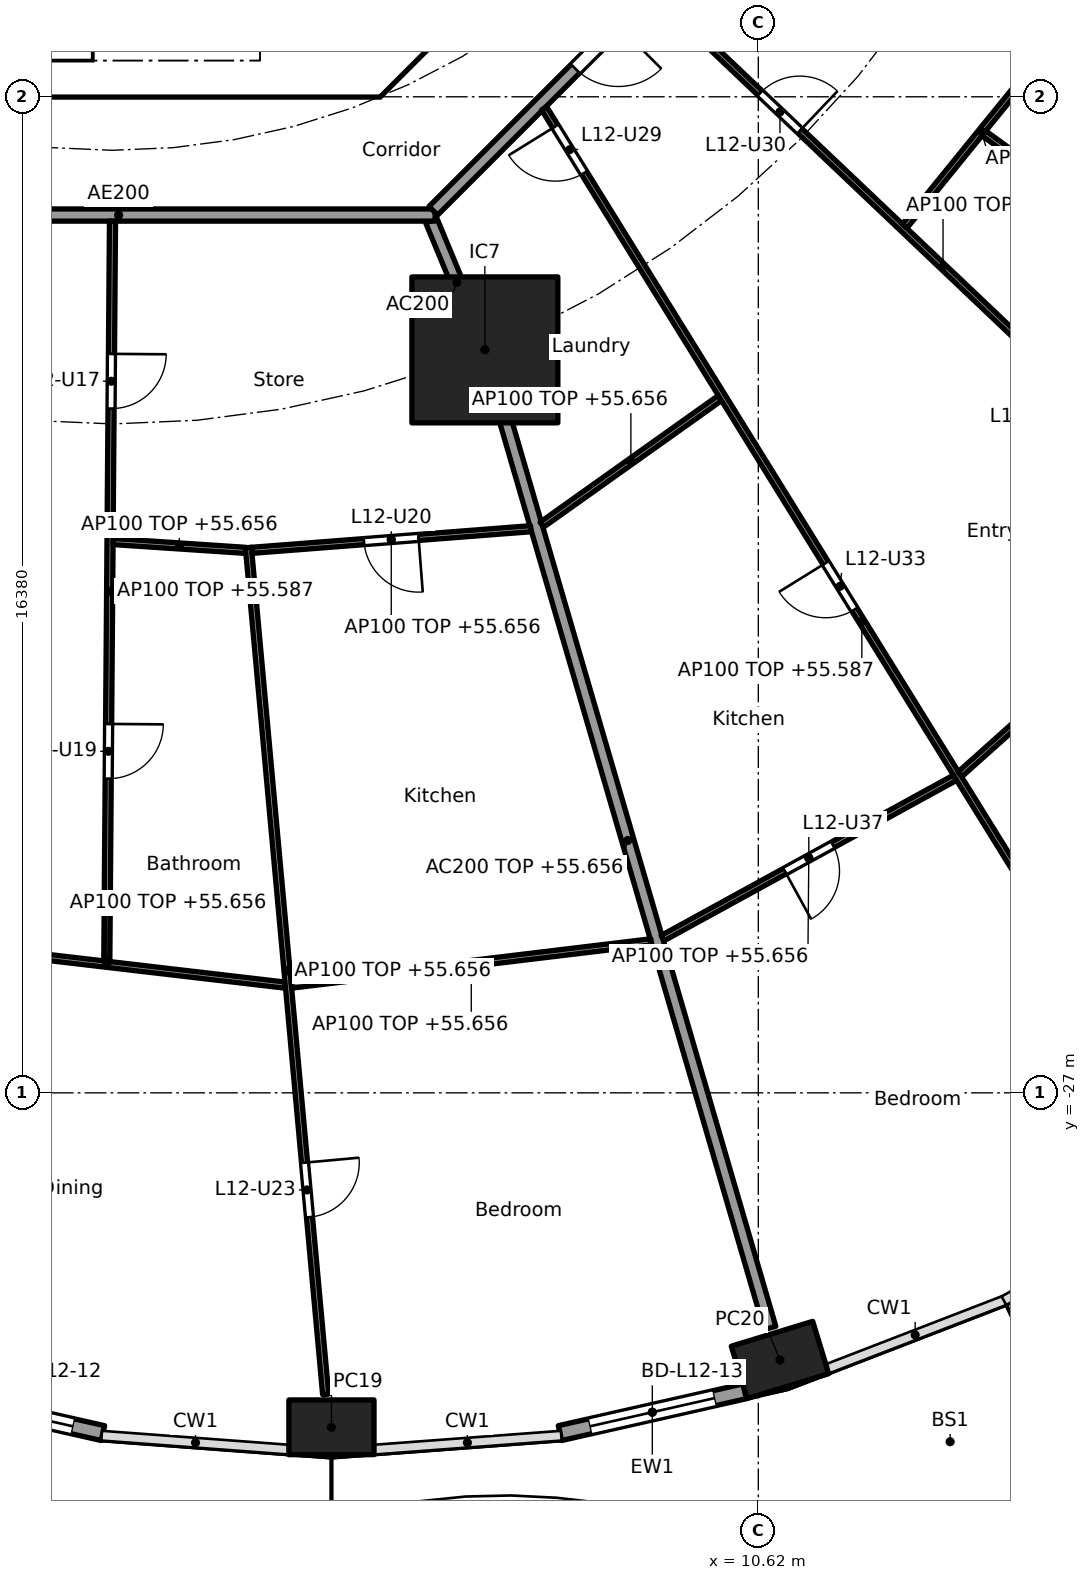
"""IFC4 building model, lengths in metres.
Left out: names, types, materials, properties, quantities, classifications, styles, units other than length and angle.
Written with IfcOpenShell. Run it as: python <this file> out.ifc"""

import sys

from ifc_helpers import new_model, si_unit, direction, frame, frame_2d, origin, origin_2d, place, context, subcontext, project, spatial, polyline, rectangle, hollow_rectangle, outline, extrude, element, fill, save


model = new_model("IFC4")
c1 = context("Model", 3, precision=1e-05, world=origin(), true_north=direction((0.0, 1.0)))
c2 = subcontext(c1, "Body", "Model", "MODEL_VIEW")
j1 = project(units=[si_unit("LENGTHUNIT", "METRE"), si_unit("PLANEANGLEUNIT", "RADIAN")], contexts=[c1])
p1 = place(None, origin())
s1 = spatial("IfcSite", under=j1, at=p1, CompositionType="ELEMENT")
p2 = place(p1, origin())
s2 = spatial("IfcBuilding", under=s1, at=p2, CompositionType="ELEMENT")
p3 = place(p2, frame((0.0, 0.0, 52.9)))
s3 = spatial("IfcBuildingStorey", under=s2, at=p3, CompositionType="ELEMENT", Elevation=52.9)
for number, where, z_axis, x_axis in (
    (1, (3.6, -32.5, 0.0), (0.0, 0.0, 1.0), (1.0, 0.0, 0.0)),
    (2, (10.976, -31.393, 0.0), (0.0, 0.0, 1.0), (0.957, 0.292, 0.0)),
):
    element("IfcColumn", number, at=place(p3, frame(where, z_axis=z_axis, x_axis=x_axis)), inside=s3, PredefinedType="COLUMN", context=c2, shape_type="SweptSolid", body=[
        extrude(hollow_rectangle(XDim=1.4, YDim=0.9, WallThickness=0.05, at=origin_2d()), origin(), (0.0, 0.0, 1.0), 3.7),
    ])
p4 = place(p3, frame((6.123, -14.782, 0.0), z_axis=(0.0, 0.0, 1.0), x_axis=(1.0, 0.0, 0.0)))
e3 = element("IfcColumn", 3, at=p4, inside=s3, PredefinedType="COLUMN", context=c2, shape_type="SweptSolid", body=[
    extrude(rectangle(XDim=2.4, YDim=2.4, at=origin_2d()), origin(), (0.0, 0.0, 1.0), 3.7),
])
p5 = place(p3, frame((-0.158, -32.596, 0.0), z_axis=(0.0, 0.0, 1.0), x_axis=(-0.975331134677, 0.220746863466, 0.0)))
e4 = element("IfcWall", 4, at=p5, inside=s3, PredefinedType="SOLIDWALL", context=c2, shape_type="SweptSolid", body=[
    extrude(rectangle(XDim=3.115, YDim=0.25, at=frame_2d((1.557, 0.0))), origin(), (0.0, 0.0, 1.0), 3.44),
])
p6 = place(p5, frame((0.507, 0.0, 0.0)))
e5 = element("IfcOpeningElement", 5, at=p6, cuts=e4, PredefinedType="OPENING", context=c2, shape_type="SweptSolid", body=[
    extrude(rectangle(XDim=2.1, YDim=2.4, at=frame_2d((1.05, 1.2))), frame((0.0, 0.135, 0.0), z_axis=(0.0, -1.0, 0.0), x_axis=(1.0, 0.0, 0.0)), (0.0, 0.0, 1.0), 0.27),
])
p7 = place(p3, frame((10.396, -31.908, 0.0), z_axis=(0.0, 0.0, 1.0), x_axis=(-0.97533495413, -0.220729987208, 0.0)))
e6 = element("IfcWall", 6, at=p7, inside=s3, PredefinedType="SOLIDWALL", context=c2, shape_type="SweptSolid", body=[
    extrude(rectangle(XDim=3.115, YDim=0.25, at=frame_2d((1.557, 0.0))), origin(), (0.0, 0.0, 1.0), 3.44),
])
p8 = place(p7, frame((0.507, 0.0, 0.0)))
e7 = element("IfcOpeningElement", 7, at=p8, cuts=e6, PredefinedType="OPENING", context=c2, shape_type="SweptSolid", body=[
    extrude(rectangle(XDim=2.1, YDim=2.4, at=frame_2d((1.05, 1.2))), frame((0.0, 0.135, 0.0), z_axis=(0.0, -1.0, 0.0), x_axis=(1.0, 0.0, 0.0)), (0.0, 0.0, 1.0), 0.27),
])
p9 = place(p3, frame((4.613, -9.988, 0.0), z_axis=(0.0, 0.0, 1.0), x_axis=(0.707106781187, 0.707106781187, 0.0)))
e8 = element("IfcWall", 8, at=p9, inside=s3, PredefinedType="SHEAR", context=c2, shape_type="SweptSolid", body=[
    extrude(rectangle(XDim=7.602, YDim=0.6, at=frame_2d((3.801, 0.0))), origin(), (0.0, 0.0, 1.0), 3.44),
])
p10 = place(p9, frame((3.201, 0.0, 0.0)))
e9 = element("IfcOpeningElement", 9, at=p10, cuts=e8, PredefinedType="OPENING", context=c2, shape_type="SweptSolid", body=[
    extrude(rectangle(XDim=1.2, YDim=2.1, at=frame_2d((0.6, 1.05))), frame((0.0, 0.31, 0.0), z_axis=(0.0, -1.0, 0.0), x_axis=(1.0, 0.0, 0.0)), (0.0, 0.0, 1.0), 0.62),
])
p11 = place(p3, frame((4.0, -10.025, 0.0), z_axis=(0.0, 0.0, 1.0), x_axis=(0.0, 1.0, 0.0)))
e10 = element("IfcWall", 10, at=p11, inside=s3, PredefinedType="SOLIDWALL", context=c2, shape_type="SweptSolid", body=[
    extrude(rectangle(XDim=3.0, YDim=0.2, at=frame_2d((1.5, 0.0))), origin(), (0.0, 0.0, 1.0), 3.44),
])
p12 = place(p11, frame((0.975, 0.0, 0.0)))
e11 = element("IfcOpeningElement", 11, at=p12, cuts=e10, PredefinedType="OPENING", context=c2, shape_type="SweptSolid", body=[
    extrude(rectangle(XDim=1.1, YDim=2.1, at=frame_2d((0.55, 1.05))), frame((0.0, 0.11, 0.0), z_axis=(0.0, -1.0, 0.0), x_axis=(1.0, 0.0, 0.0)), (0.0, 0.0, 1.0), 0.22),
])
p13 = place(p3, origin())
e12 = element("IfcWall", 12, at=p13, inside=s3, PredefinedType="SHEAR", context=c2, shape_type="SweptSolid", body=[
    extrude(outline(polyline([(-4.152, -10.025), (4.152, -10.025), (4.401, -9.776), (4.825, -10.2), (4.401, -10.625), (-4.401, -10.625), (-4.825, -10.2), (-4.401, -9.776), (-4.152, -10.025)])), origin(), (0.0, 0.0, 1.0), 3.44),
])
p14 = place(p3, frame((5.243, -12.657, 0.0), z_axis=(0.0, 0.0, 1.0), x_axis=(0.382707856524, -0.923869415315, 0.0)))
e13 = element("IfcWall", 13, at=p14, inside=s3, PredefinedType="PARTITIONING", context=c2, shape_type="SweptSolid", body=[
    extrude(rectangle(XDim=2.2, YDim=0.2, at=frame_2d((1.1, 0.0))), origin(), (0.0, 0.0, 1.0), 3.44),
])
p15 = place(p3, frame((6.137, -14.83, 0.0), z_axis=(0.0, 0.0, 1.0), x_axis=(0.27985745069, -0.960041565399, 0.0)))
e14 = element("IfcWall", 14, at=p15, inside=s3, PredefinedType="PARTITIONING", context=c2, shape_type="SweptSolid", body=[
    extrude(rectangle(XDim=16.705, YDim=0.2, at=frame_2d((8.353, 0.0))), origin(), (0.0, 0.0, 1.0), 2.756),
])
p16 = place(p3, frame((-5.104, -12.565, 0.0), z_axis=(0.0, 0.0, 1.0), x_axis=(1.0, 0.0, 0.0)))
e15 = element("IfcWall", 15, at=p16, inside=s3, PredefinedType="PARTITIONING", context=c2, shape_type="SweptSolid", body=[
    extrude(rectangle(XDim=10.409, YDim=0.2, at=frame_2d((5.205, 0.0))), origin(), (0.0, 0.0, 1.0), 3.44),
])
p17 = place(p16, frame((2.87, 0.0, 0.0)))
e16 = element("IfcOpeningElement", 16, at=p17, cuts=e15, PredefinedType="OPENING", context=c2, shape_type="SweptSolid", body=[
    extrude(rectangle(XDim=1.0, YDim=2.1, at=frame_2d((0.5, 1.05))), frame((0.0, 0.11, 0.0), z_axis=(0.0, -1.0, 0.0), x_axis=(1.0, 0.0, 0.0)), (0.0, 0.0, 1.0), 0.22),
])
p18 = place(p3, frame((5.275, -12.494, 0.0), z_axis=(0.0, 0.0, 1.0), x_axis=(0.707106781187, 0.707106781187, 0.0)))
e17 = element("IfcWall", 17, at=p18, inside=s3, PredefinedType="PARTITIONING", context=c2, shape_type="SweptSolid", body=[
    extrude(rectangle(XDim=10.409, YDim=0.2, at=frame_2d((5.205, 0.0))), origin(), (0.0, 0.0, 1.0), 3.44),
])
p19 = place(p18, frame((3.303, 0.0, 0.0)))
e18 = element("IfcOpeningElement", 18, at=p19, cuts=e17, PredefinedType="OPENING", context=c2, shape_type="SweptSolid", body=[
    extrude(rectangle(XDim=1.0, YDim=2.1, at=frame_2d((0.5, 1.05))), frame((0.0, 0.11, 0.0), z_axis=(0.0, -1.0, 0.0), x_axis=(1.0, 0.0, 0.0)), (0.0, 0.0, 1.0), 0.22),
])
p20 = place(p3, frame((-3.031, -24.543, 0.0), z_axis=(0.0, 0.0, 1.0), x_axis=(0.993255612046, -0.115945198862, 0.0)))
e19 = element("IfcWall", 19, at=p20, inside=s3, PredefinedType="PARTITIONING", context=c2, shape_type="SweptSolid", body=[
    extrude(rectangle(XDim=5.913, YDim=0.1, at=frame_2d((2.956, 0.0))), origin(), (0.0, 0.0, 1.0), 2.756),
])
p21 = place(p3, frame((-0.001, -12.665, 0.0), z_axis=(0.0, 0.0, 1.0), x_axis=(-0.007702417287, -0.999970335944, 0.0)))
e20 = element("IfcWall", 20, at=p21, inside=s3, PredefinedType="PARTITIONING", context=c2, shape_type="SweptSolid", body=[
    extrude(rectangle(XDim=12.171, YDim=0.1, at=frame_2d((6.086, 0.0))), origin(), (0.0, 0.0, 1.0), 2.687),
])
p22 = place(p21, frame((2.183, 0.0, 0.0)))
e21 = element("IfcOpeningElement", 21, at=p22, cuts=e20, PredefinedType="OPENING", context=c2, shape_type="SweptSolid", body=[
    extrude(rectangle(XDim=0.9, YDim=2.1, at=frame_2d((0.45, 1.05))), frame((0.0, 0.06, 0.0), z_axis=(0.0, -1.0, 0.0), x_axis=(1.0, 0.0, 0.0)), (0.0, 0.0, 1.0), 0.12),
])
p23 = place(p21, frame((8.269, 0.0, 0.0)))
e22 = element("IfcOpeningElement", 22, at=p23, cuts=e20, PredefinedType="OPENING", context=c2, shape_type="SweptSolid", body=[
    extrude(rectangle(XDim=0.9, YDim=2.1, at=frame_2d((0.45, 1.05))), frame((0.0, 0.06, 0.0), z_axis=(0.0, -1.0, 0.0), x_axis=(1.0, 0.0, 0.0)), (0.0, 0.0, 1.0), 0.12),
])
p24 = place(p3, frame((0.009, -17.934, 0.0), z_axis=(0.0, 0.0, 1.0), x_axis=(0.997794542617, -0.066378089183, 0.0)))
e23 = element("IfcWall", 23, at=p24, inside=s3, PredefinedType="PARTITIONING", context=c2, shape_type="SweptSolid", body=[
    extrude(rectangle(XDim=2.185, YDim=0.1, at=frame_2d((1.092, 0.0))), origin(), (0.0, 0.0, 1.0), 2.756),
])
p25 = place(p3, frame((2.234, -18.032, 0.0), z_axis=(0.0, 0.0, 1.0), x_axis=(0.090891502968, -0.995860800859, 0.0)))
e24 = element("IfcWall", 24, at=p25, inside=s3, PredefinedType="PARTITIONING", context=c2, shape_type="SweptSolid", body=[
    extrude(rectangle(XDim=13.984, YDim=0.1, at=frame_2d((6.992, 0.0))), origin(), (0.0, 0.0, 1.0), 2.756),
])
p26 = place(p25, frame((10.158, 0.0, 0.0)))
e25 = element("IfcOpeningElement", 25, at=p26, cuts=e24, PredefinedType="OPENING", context=c2, shape_type="SweptSolid", body=[
    extrude(rectangle(XDim=0.9, YDim=2.1, at=frame_2d((0.45, 1.05))), frame((0.0, 0.06, 0.0), z_axis=(0.0, -1.0, 0.0), x_axis=(1.0, 0.0, 0.0)), (0.0, 0.0, 1.0), 0.12),
])
p27 = place(p3, frame((2.288, -18.078, 0.0), z_axis=(0.0, 0.0, 1.0), x_axis=(0.99701850123, 0.077162868047, 0.0)))
e26 = element("IfcWall", 26, at=p27, inside=s3, PredefinedType="PARTITIONING", context=c2, shape_type="SweptSolid", body=[
    extrude(rectangle(XDim=4.604, YDim=0.1, at=frame_2d((2.302, 0.0))), origin(), (0.0, 0.0, 1.0), 2.756),
])
p28 = place(p27, frame((1.852, 0.0, 0.0)))
e27 = element("IfcOpeningElement", 27, at=p28, cuts=e26, PredefinedType="OPENING", context=c2, shape_type="SweptSolid", body=[
    extrude(rectangle(XDim=0.9, YDim=2.1, at=frame_2d((0.45, 1.05))), frame((0.0, 0.06, 0.0), z_axis=(0.0, -1.0, 0.0), x_axis=(1.0, 0.0, 0.0)), (0.0, 0.0, 1.0), 0.12),
])
p29 = place(p3, frame((2.941, -25.229, 0.0), z_axis=(0.0, 0.0, 1.0), x_axis=(0.992834127896, 0.119500604542, 0.0)))
e28 = element("IfcWall", 28, at=p29, inside=s3, PredefinedType="PARTITIONING", context=c2, shape_type="SweptSolid", body=[
    extrude(rectangle(XDim=5.959, YDim=0.1, at=frame_2d((2.98, 0.0))), origin(), (0.0, 0.0, 1.0), 2.756),
])
p30 = place(p3, frame((7.06, -17.657, 0.0), z_axis=(0.0, 0.0, 1.0), x_axis=(0.81492039338, 0.57957290521, 0.0)))
e29 = element("IfcWall", 29, at=p30, inside=s3, PredefinedType="PARTITIONING", context=c2, shape_type="SweptSolid", body=[
    extrude(rectangle(XDim=3.594, YDim=0.1, at=frame_2d((1.797, 0.0))), origin(), (0.0, 0.0, 1.0), 2.756),
])
p31 = place(p3, frame((9.045, -24.456, 0.0), z_axis=(0.0, 0.0, 1.0), x_axis=(0.876809987787, 0.480837025734, 0.0)))
e30 = element("IfcWall", 30, at=p31, inside=s3, PredefinedType="PARTITIONING", context=c2, shape_type="SweptSolid", body=[
    extrude(rectangle(XDim=5.486, YDim=0.1, at=frame_2d((2.743, 0.0))), origin(), (0.0, 0.0, 1.0), 2.756),
])
p32 = place(p31, frame((2.293, 0.0, 0.0)))
e31 = element("IfcOpeningElement", 31, at=p32, cuts=e30, PredefinedType="OPENING", context=c2, shape_type="SweptSolid", body=[
    extrude(rectangle(XDim=0.9, YDim=2.1, at=frame_2d((0.45, 1.05))), frame((0.0, 0.06, 0.0), z_axis=(0.0, -1.0, 0.0), x_axis=(1.0, 0.0, 0.0)), (0.0, 0.0, 1.0), 0.12),
])
p33 = place(p3, frame((7.097, -10.81, 0.0), z_axis=(0.0, 0.0, 1.0), x_axis=(0.526453266471, -0.850204068576, 0.0)))
e32 = element("IfcWall", 32, at=p33, inside=s3, PredefinedType="PARTITIONING", context=c2, shape_type="SweptSolid", body=[
    extrude(rectangle(XDim=19.85, YDim=0.1, at=frame_2d((9.925, 0.0))), origin(), (0.0, 0.0, 1.0), 2.687),
])
p34 = place(p33, frame((0.35, 0.0, 0.0)))
e33 = element("IfcOpeningElement", 33, at=p34, cuts=e32, PredefinedType="OPENING", context=c2, shape_type="SweptSolid", body=[
    extrude(rectangle(XDim=0.9, YDim=2.1, at=frame_2d((0.45, 1.05))), frame((0.0, 0.06, 0.0), z_axis=(0.0, -1.0, 0.0), x_axis=(1.0, 0.0, 0.0)), (0.0, 0.0, 1.0), 0.12),
])
p35 = place(p33, frame((8.795, 0.0, 0.0)))
e34 = element("IfcOpeningElement", 34, at=p35, cuts=e32, PredefinedType="OPENING", context=c2, shape_type="SweptSolid", body=[
    extrude(rectangle(XDim=0.9, YDim=2.1, at=frame_2d((0.45, 1.05))), frame((0.0, 0.06, 0.0), z_axis=(0.0, -1.0, 0.0), x_axis=(1.0, 0.0, 0.0)), (0.0, 0.0, 1.0), 0.12),
])
p36 = place(p3, frame((13.936, -21.761, 0.0), z_axis=(0.0, 0.0, 1.0), x_axis=(0.745806142791, 0.666163041136, 0.0)))
e35 = element("IfcWall", 35, at=p36, inside=s3, PredefinedType="PARTITIONING", context=c2, shape_type="SweptSolid", body=[
    extrude(rectangle(XDim=5.831, YDim=0.1, at=frame_2d((2.915, 0.0))), origin(), (0.0, 0.0, 1.0), 2.756),
])
p37 = place(p36, frame((2.465, 0.0, 0.0)))
e36 = element("IfcOpeningElement", 36, at=p37, cuts=e35, PredefinedType="OPENING", context=c2, shape_type="SweptSolid", body=[
    extrude(rectangle(XDim=0.9, YDim=2.1, at=frame_2d((0.45, 1.05))), frame((0.0, 0.06, 0.0), z_axis=(0.0, -1.0, 0.0), x_axis=(1.0, 0.0, 0.0)), (0.0, 0.0, 1.0), 0.12),
])
p38 = place(p3, frame((8.957, -8.953, 0.0), z_axis=(0.0, 0.0, 1.0), x_axis=(0.725250022034, -0.688485588476, 0.0)))
e37 = element("IfcWall", 37, at=p38, inside=s3, PredefinedType="PARTITIONING", context=c2, shape_type="SweptSolid", body=[
    extrude(rectangle(XDim=12.963, YDim=0.1, at=frame_2d((6.481, 0.0))), origin(), (0.0, 0.0, 1.0), 2.687),
])
p39 = place(p38, frame((2.333, 0.0, 0.0)))
e38 = element("IfcOpeningElement", 38, at=p39, cuts=e37, PredefinedType="OPENING", context=c2, shape_type="SweptSolid", body=[
    extrude(rectangle(XDim=0.9, YDim=2.1, at=frame_2d((0.45, 1.05))), frame((0.0, 0.06, 0.0), z_axis=(0.0, -1.0, 0.0), x_axis=(1.0, 0.0, 0.0)), (0.0, 0.0, 1.0), 0.12),
])
p40 = place(p38, frame((8.79, 0.0, 0.0)))
e39 = element("IfcOpeningElement", 39, at=p40, cuts=e37, PredefinedType="OPENING", context=c2, shape_type="SweptSolid", body=[
    extrude(rectangle(XDim=0.9, YDim=2.1, at=frame_2d((0.45, 1.05))), frame((0.0, 0.06, 0.0), z_axis=(0.0, -1.0, 0.0), x_axis=(1.0, 0.0, 0.0)), (0.0, 0.0, 1.0), 0.12),
])
p41 = place(p3, frame((13.026, -12.747, 0.0), z_axis=(0.0, 0.0, 1.0), x_axis=(0.630126826288, 0.776492229705, 0.0)))
e40 = element("IfcWall", 40, at=p41, inside=s3, PredefinedType="PARTITIONING", context=c2, shape_type="SweptSolid", body=[
    extrude(rectangle(XDim=4.007, YDim=0.1, at=frame_2d((2.003, 0.0))), origin(), (0.0, 0.0, 1.0), 2.756),
])
p42 = place(p3, frame((14.329, -11.221, 0.0), z_axis=(0.0, 0.0, 1.0), x_axis=(0.810671130917, -0.58550176558, 0.0)))
e41 = element("IfcWall", 41, at=p42, inside=s3, PredefinedType="PARTITIONING", context=c2, shape_type="SweptSolid", body=[
    extrude(rectangle(XDim=15.106, YDim=0.1, at=frame_2d((7.553, 0.0))), origin(), (0.0, 0.0, 1.0), 2.837),
])
p43 = place(p42, frame((10.659, 0.0, 0.0)))
e42 = element("IfcOpeningElement", 42, at=p43, cuts=e41, PredefinedType="OPENING", context=c2, shape_type="SweptSolid", body=[
    extrude(rectangle(XDim=0.9, YDim=2.1, at=frame_2d((0.45, 1.05))), frame((0.0, 0.06, 0.0), z_axis=(0.0, -1.0, 0.0), x_axis=(1.0, 0.0, 0.0)), (0.0, 0.0, 1.0), 0.12),
])
p44 = place(p6, origin())
e43 = element("IfcDoor", 43, at=p44, inside=s3, OperationType="SLIDING_TO_LEFT", PredefinedType="DOOR", context=c2, shape_type="SweptSolid", body=[
    extrude(rectangle(XDim=2.1, YDim=2.4, at=frame_2d((1.05, 1.2))), frame((0.0, 0.025, 0.0), z_axis=(0.0, -1.0, 0.0), x_axis=(1.0, 0.0, 0.0)), (0.0, 0.0, 1.0), 0.05),
])
fill(e5, e43)
p45 = place(p8, origin())
e44 = element("IfcDoor", 44, at=p45, inside=s3, OperationType="SLIDING_TO_LEFT", PredefinedType="DOOR", context=c2, shape_type="SweptSolid", body=[
    extrude(rectangle(XDim=2.1, YDim=2.4, at=frame_2d((1.05, 1.2))), frame((0.0, 0.025, 0.0), z_axis=(0.0, -1.0, 0.0), x_axis=(1.0, 0.0, 0.0)), (0.0, 0.0, 1.0), 0.05),
])
fill(e7, e44)
p46 = place(p22, origin())
e45 = element("IfcDoor", 45, at=p46, inside=s3, OperationType="SINGLE_SWING_LEFT", PredefinedType="DOOR", context=c2, shape_type="SweptSolid", body=[
    extrude(rectangle(XDim=0.9, YDim=2.1, at=frame_2d((0.45, 1.05))), frame((0.0, 0.025, 0.0), z_axis=(0.0, -1.0, 0.0), x_axis=(1.0, 0.0, 0.0)), (0.0, 0.0, 1.0), 0.05),
])
fill(e21, e45)
p47 = place(p23, origin())
e46 = element("IfcDoor", 46, at=p47, inside=s3, OperationType="SINGLE_SWING_LEFT", PredefinedType="DOOR", context=c2, shape_type="SweptSolid", body=[
    extrude(rectangle(XDim=0.9, YDim=2.1, at=frame_2d((0.45, 1.05))), frame((0.0, 0.025, 0.0), z_axis=(0.0, -1.0, 0.0), x_axis=(1.0, 0.0, 0.0)), (0.0, 0.0, 1.0), 0.05),
])
fill(e22, e46)
p48 = place(p28, frame((0.9, 0.0, 0.0), x_axis=(-1.0, 0.0, 0.0)))
e47 = element("IfcDoor", 47, at=p48, inside=s3, OperationType="SINGLE_SWING_LEFT", PredefinedType="DOOR", context=c2, shape_type="SweptSolid", body=[
    extrude(rectangle(XDim=0.9, YDim=2.1, at=frame_2d((0.45, 1.05))), frame((0.0, 0.025, 0.0), z_axis=(0.0, -1.0, 0.0), x_axis=(1.0, 0.0, 0.0)), (0.0, 0.0, 1.0), 0.05),
])
fill(e27, e47)
p49 = place(p26, origin())
e48 = element("IfcDoor", 48, at=p49, inside=s3, OperationType="SINGLE_SWING_LEFT", PredefinedType="DOOR", context=c2, shape_type="SweptSolid", body=[
    extrude(rectangle(XDim=0.9, YDim=2.1, at=frame_2d((0.45, 1.05))), frame((0.0, 0.025, 0.0), z_axis=(0.0, -1.0, 0.0), x_axis=(1.0, 0.0, 0.0)), (0.0, 0.0, 1.0), 0.05),
])
fill(e25, e48)
p50 = place(p19, frame((1.0, 0.0, 0.0), x_axis=(-1.0, 0.0, 0.0)))
e49 = element("IfcDoor", 49, at=p50, inside=s3, OperationType="SINGLE_SWING_LEFT", PredefinedType="DOOR", context=c2, shape_type="SweptSolid", body=[
    extrude(rectangle(XDim=1.0, YDim=2.1, at=frame_2d((0.5, 1.05))), frame((0.0, 0.025, 0.0), z_axis=(0.0, -1.0, 0.0), x_axis=(1.0, 0.0, 0.0)), (0.0, 0.0, 1.0), 0.05),
])
fill(e18, e49)
p51 = place(p34, frame((0.9, 0.0, 0.0), x_axis=(-1.0, 0.0, 0.0)))
e50 = element("IfcDoor", 50, at=p51, inside=s3, OperationType="SINGLE_SWING_RIGHT", PredefinedType="DOOR", context=c2, shape_type="SweptSolid", body=[
    extrude(rectangle(XDim=0.9, YDim=2.1, at=frame_2d((0.45, 1.05))), frame((0.0, 0.025, 0.0), z_axis=(0.0, -1.0, 0.0), x_axis=(1.0, 0.0, 0.0)), (0.0, 0.0, 1.0), 0.05),
])
fill(e33, e50)
p52 = place(p39, origin())
e51 = element("IfcDoor", 51, at=p52, inside=s3, OperationType="SINGLE_SWING_RIGHT", PredefinedType="DOOR", context=c2, shape_type="SweptSolid", body=[
    extrude(rectangle(XDim=0.9, YDim=2.1, at=frame_2d((0.45, 1.05))), frame((0.0, 0.025, 0.0), z_axis=(0.0, -1.0, 0.0), x_axis=(1.0, 0.0, 0.0)), (0.0, 0.0, 1.0), 0.05),
])
fill(e38, e51)
p53 = place(p35, frame((0.9, 0.0, 0.0), x_axis=(-1.0, 0.0, 0.0)))
e52 = element("IfcDoor", 52, at=p53, inside=s3, OperationType="SINGLE_SWING_RIGHT", PredefinedType="DOOR", context=c2, shape_type="SweptSolid", body=[
    extrude(rectangle(XDim=0.9, YDim=2.1, at=frame_2d((0.45, 1.05))), frame((0.0, 0.025, 0.0), z_axis=(0.0, -1.0, 0.0), x_axis=(1.0, 0.0, 0.0)), (0.0, 0.0, 1.0), 0.05),
])
fill(e34, e52)
p54 = place(p32, frame((0.9, 0.0, 0.0), x_axis=(-1.0, 0.0, 0.0)))
e53 = element("IfcDoor", 53, at=p54, inside=s3, OperationType="SINGLE_SWING_RIGHT", PredefinedType="DOOR", context=c2, shape_type="SweptSolid", body=[
    extrude(rectangle(XDim=0.9, YDim=2.1, at=frame_2d((0.45, 1.05))), frame((0.0, 0.025, 0.0), z_axis=(0.0, -1.0, 0.0), x_axis=(1.0, 0.0, 0.0)), (0.0, 0.0, 1.0), 0.05),
])
fill(e31, e53)
save(model, sys.argv[1])
